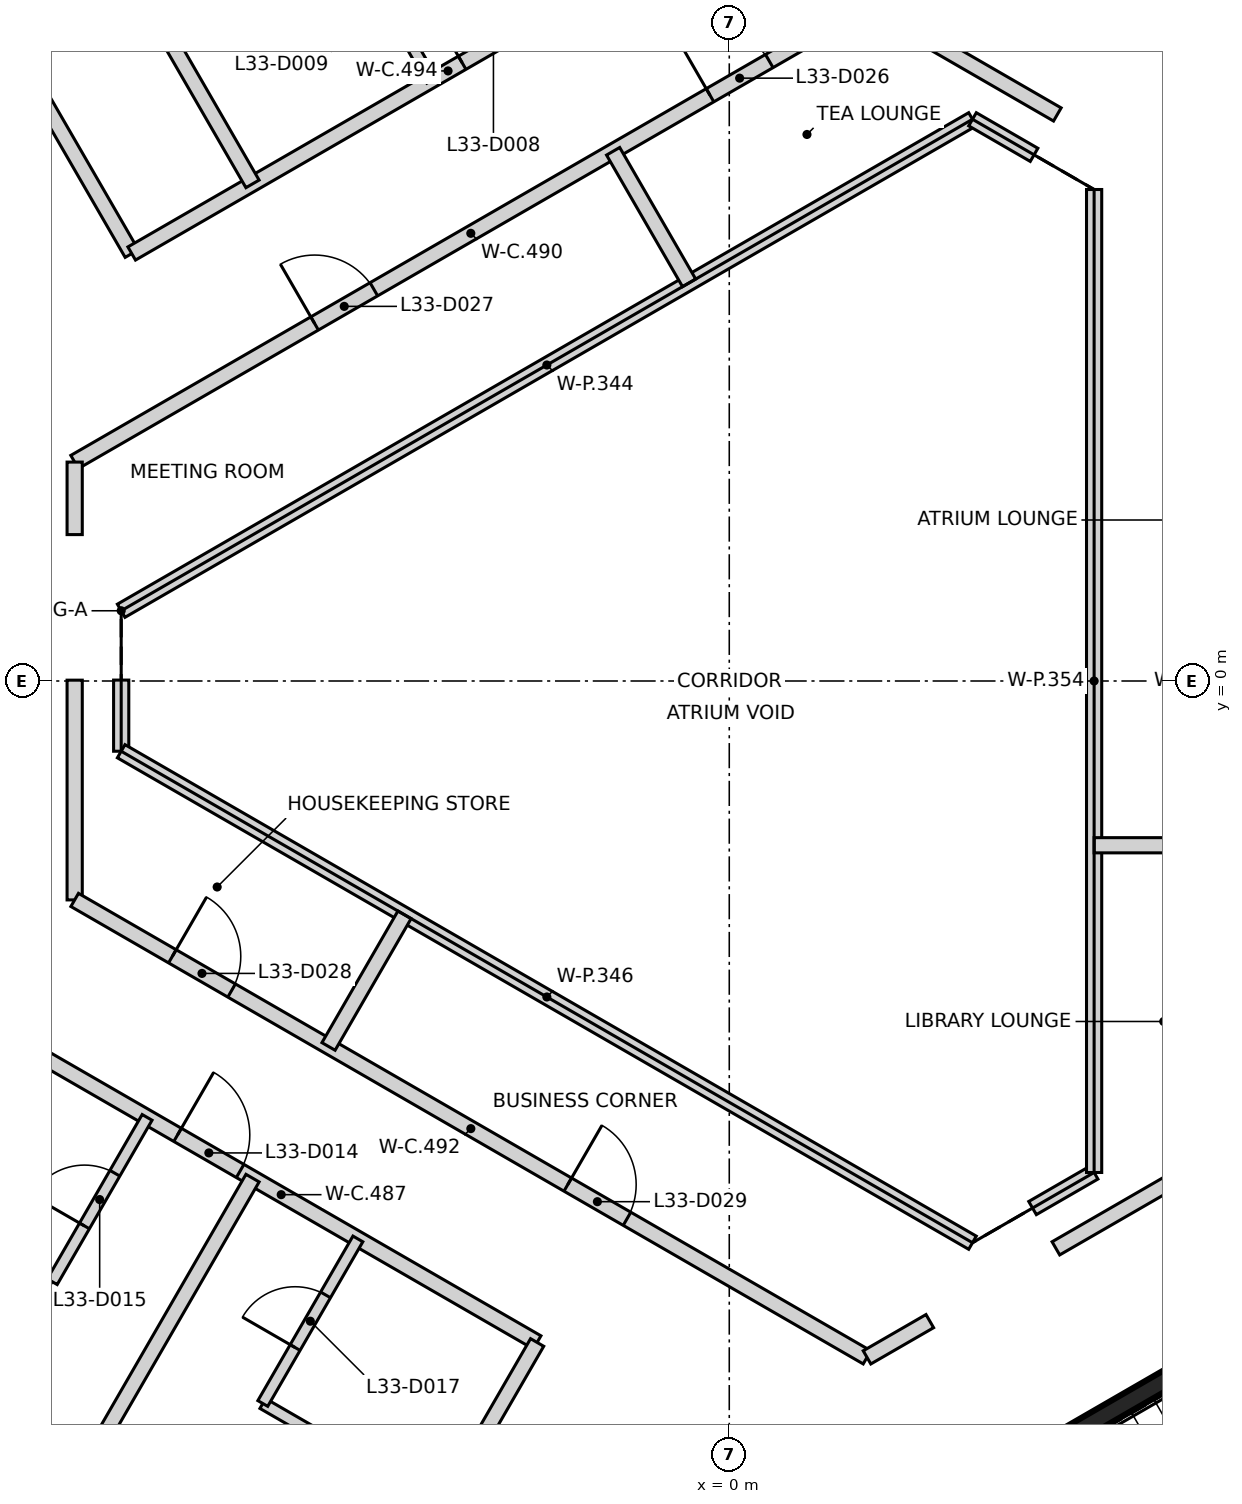
"""IFC4 building model, lengths in metres.
Left out: names, types, materials, properties, quantities, classifications, styles, units other than length and angle.
Written with IfcOpenShell. Run it as: python <this file> out.ifc"""

import sys

from ifc_helpers import new_model, si_unit, direction, frame, frame_2d, origin, place, context, subcontext, project, spatial, rectangle, extrude, element, fill, save


model = new_model("IFC4")
c1 = context("Model", 3, precision=1e-05, world=origin(), true_north=direction((0.0, 1.0)))
c2 = subcontext(c1, "Body", "Model", "MODEL_VIEW")
j1 = project(units=[si_unit("LENGTHUNIT", "METRE"), si_unit("PLANEANGLEUNIT", "RADIAN")], contexts=[c1])
p1 = place(None, origin())
s1 = spatial("IfcSite", under=j1, at=p1, CompositionType="ELEMENT")
p2 = place(p1, origin())
s2 = spatial("IfcBuilding", under=s1, at=p2, CompositionType="ELEMENT")
p3 = place(p2, frame((0.0, 0.0, 136.0)))
s3 = spatial("IfcBuildingStorey", under=s2, at=p3, CompositionType="ELEMENT", Elevation=136.0)
p4 = place(p3, frame((10.42, 6.498, 0.0), z_axis=(0.0, 0.0, 1.0), x_axis=(-0.866021906294, 0.500006057782, 0.0)))
e1 = element("IfcWall", 1, at=p4, inside=s3, PredefinedType="SHEAR", context=c2, shape_type="SweptSolid", body=[
    extrude(rectangle(XDim=11.55, YDim=0.25, at=frame_2d((5.775, 0.0))), origin(), (0.0, 0.0, 1.0), 3.2),
])
p5 = place(p4, frame((10.025, 0.0, 0.0)))
e2 = element("IfcOpeningElement", 2, at=p5, cuts=e1, PredefinedType="OPENING", context=c2, shape_type="SweptSolid", body=[
    extrude(rectangle(XDim=1.2, YDim=2.1, at=frame_2d((0.6, 1.05))), frame((0.0, 0.135, 0.0), z_axis=(0.0, -1.0, 0.0), x_axis=(1.0, 0.0, 0.0)), (0.0, 0.0, 1.0), 0.27),
])
p6 = place(p4, frame((8.725, 0.0, 0.0)))
e3 = element("IfcOpeningElement", 3, at=p6, cuts=e1, PredefinedType="OPENING", context=c2, shape_type="SweptSolid", body=[
    extrude(rectangle(XDim=1.2, YDim=2.1, at=frame_2d((0.6, 1.05))), frame((0.0, 0.135, 0.0), z_axis=(0.0, -1.0, 0.0), x_axis=(1.0, 0.0, 0.0)), (0.0, 0.0, 1.0), 0.27),
])
p7 = place(p3, frame((0.417, -12.273, 0.0), z_axis=(0.0, 0.0, 1.0), x_axis=(0.866021906294, 0.500006057782, 0.0)))
e4 = element("IfcWall", 4, at=p7, inside=s3, PredefinedType="SHEAR", context=c2, shape_type="SweptSolid", body=[
    extrude(rectangle(XDim=11.55, YDim=0.25, at=frame_2d((5.775, 0.0))), origin(), (0.0, 0.0, 1.0), 3.2),
])
p8 = place(p7, frame((10.025, 0.0, 0.0)))
e5 = element("IfcOpeningElement", 5, at=p8, cuts=e4, PredefinedType="OPENING", context=c2, shape_type="SweptSolid", body=[
    extrude(rectangle(XDim=1.2, YDim=2.1, at=frame_2d((0.6, 1.05))), frame((0.0, 0.135, 0.0), z_axis=(0.0, -1.0, 0.0), x_axis=(1.0, 0.0, 0.0)), (0.0, 0.0, 1.0), 0.27),
])
p9 = place(p7, frame((8.725, 0.0, 0.0)))
e6 = element("IfcOpeningElement", 6, at=p9, cuts=e4, PredefinedType="OPENING", context=c2, shape_type="SweptSolid", body=[
    extrude(rectangle(XDim=1.2, YDim=2.1, at=frame_2d((0.6, 1.05))), frame((0.0, 0.135, 0.0), z_axis=(0.0, -1.0, 0.0), x_axis=(1.0, 0.0, 0.0)), (0.0, 0.0, 1.0), 0.27),
])
p10 = place(p3, frame((-9.262, -4.814, 0.0), z_axis=(0.0, 0.0, 1.0), x_axis=(0.866109782156, -0.499853823887, 0.0)))
e7 = element("IfcWall", 7, at=p10, inside=s3, PredefinedType="PARTITIONING", context=c2, shape_type="SweptSolid", body=[
    extrude(rectangle(XDim=7.776, YDim=0.2, at=frame_2d((3.888, 0.0))), origin(), (0.0, 0.0, 1.0), 3.2),
])
p11 = place(p10, frame((2.314, 0.0, 0.0)))
e8 = element("IfcOpeningElement", 8, at=p11, cuts=e7, PredefinedType="OPENING", context=c2, shape_type="SweptSolid", body=[
    extrude(rectangle(XDim=0.95, YDim=2.1, at=frame_2d((0.475, 1.05))), frame((0.0, 0.11, 0.0), z_axis=(0.0, -1.0, 0.0), x_axis=(1.0, 0.0, 0.0)), (0.0, 0.0, 1.0), 0.22),
])
p12 = place(p3, frame((-9.033, 7.651, 0.0), z_axis=(0.0, 0.0, 1.0), x_axis=(0.500354010599, -0.865820919173, 0.0)))
e9 = element("IfcWall", 9, at=p12, inside=s3, PredefinedType="PARTITIONING", context=c2, shape_type="SweptSolid", body=[
    extrude(rectangle(XDim=2.342, YDim=0.2, at=frame_2d((1.171, 0.0))), origin(), (0.0, 0.0, 1.0), 3.2),
])
p13 = place(p3, frame((-8.613, 2.881, 0.0), z_axis=(0.0, 0.0, 1.0), x_axis=(0.866103179807, 0.499865263774, 0.0)))
e10 = element("IfcWall", 10, at=p13, inside=s3, PredefinedType="PARTITIONING", context=c2, shape_type="SweptSolid", body=[
    extrude(rectangle(XDim=12.036, YDim=0.2, at=frame_2d((6.018, 0.0))), origin(), (0.0, 0.0, 1.0), 3.2),
])
p14 = place(p13, frame((9.652, 0.0, 0.0)))
e11 = element("IfcOpeningElement", 11, at=p14, cuts=e10, PredefinedType="OPENING", context=c2, shape_type="SweptSolid", body=[
    extrude(rectangle(XDim=0.9, YDim=2.1, at=frame_2d((0.45, 1.05))), frame((0.0, 0.11, 0.0), z_axis=(0.0, -1.0, 0.0), x_axis=(1.0, 0.0, 0.0)), (0.0, 0.0, 1.0), 0.22),
])
p15 = place(p13, frame((3.646, 0.0, 0.0)))
e12 = element("IfcOpeningElement", 12, at=p15, cuts=e10, PredefinedType="OPENING", context=c2, shape_type="SweptSolid", body=[
    extrude(rectangle(XDim=0.9, YDim=2.1, at=frame_2d((0.45, 1.05))), frame((0.0, 0.11, 0.0), z_axis=(0.0, -1.0, 0.0), x_axis=(1.0, 0.0, 0.0)), (0.0, 0.0, 1.0), 0.22),
])
p16 = place(p3, frame((-8.612, -2.88, 0.0), z_axis=(0.0, 0.0, 1.0), x_axis=(0.0, 1.0, 0.0)))
e13 = element("IfcWall", 13, at=p16, inside=s3, PredefinedType="PARTITIONING", context=c2, shape_type="SweptSolid", body=[
    extrude(rectangle(XDim=2.891, YDim=0.2, at=frame_2d((1.445, 0.0))), origin(), (0.0, 0.0, 1.0), 2.3),
])
p17 = place(p3, frame((-8.612, -2.88, 0.0), z_axis=(0.0, 0.0, 1.0), x_axis=(0.866035279512, -0.499982894348, 0.0)))
e14 = element("IfcWall", 14, at=p17, inside=s3, PredefinedType="PARTITIONING", context=c2, shape_type="SweptSolid", body=[
    extrude(rectangle(XDim=12.037, YDim=0.2, at=frame_2d((6.018, 0.0))), origin(), (0.0, 0.0, 1.0), 3.2),
])
p18 = place(p17, frame((1.484, 0.0, 0.0)))
e15 = element("IfcOpeningElement", 15, at=p18, cuts=e14, PredefinedType="OPENING", context=c2, shape_type="SweptSolid", body=[
    extrude(rectangle(XDim=0.9, YDim=2.1, at=frame_2d((0.45, 1.05))), frame((0.0, 0.11, 0.0), z_axis=(0.0, -1.0, 0.0), x_axis=(1.0, 0.0, 0.0)), (0.0, 0.0, 1.0), 0.22),
])
p19 = place(p17, frame((7.491, 0.0, 0.0)))
e16 = element("IfcOpeningElement", 16, at=p19, cuts=e14, PredefinedType="OPENING", context=c2, shape_type="SweptSolid", body=[
    extrude(rectangle(XDim=0.9, YDim=2.1, at=frame_2d((0.45, 1.05))), frame((0.0, 0.11, 0.0), z_axis=(0.0, -1.0, 0.0), x_axis=(1.0, 0.0, 0.0)), (0.0, 0.0, 1.0), 0.22),
])
p20 = place(p3, frame((-8.612, 1.926, 0.0), z_axis=(0.0, 0.0, 1.0), x_axis=(0.0, 1.0, 0.0)))
e17 = element("IfcWall", 17, at=p20, inside=s3, PredefinedType="PARTITIONING", context=c2, shape_type="SweptSolid", body=[
    extrude(rectangle(XDim=0.954, YDim=0.2, at=frame_2d((0.477, 0.0))), origin(), (0.0, 0.0, 1.0), 3.2),
])
p21 = place(p3, frame((-7.862, 5.624, 0.0), z_axis=(0.0, 0.0, 1.0), x_axis=(0.866109024618, 0.499855136491, 0.0)))
e18 = element("IfcWall", 18, at=p21, inside=s3, PredefinedType="PARTITIONING", context=c2, shape_type="SweptSolid", body=[
    extrude(rectangle(XDim=9.61, YDim=0.2, at=frame_2d((4.805, 0.0))), origin(), (0.0, 0.0, 1.0), 3.2),
])
p22 = place(p21, frame((6.345, 0.0, 0.0)))
e19 = element("IfcOpeningElement", 19, at=p22, cuts=e18, PredefinedType="OPENING", context=c2, shape_type="SweptSolid", body=[
    extrude(rectangle(XDim=0.95, YDim=2.1, at=frame_2d((0.475, 1.05))), frame((0.0, 0.11, 0.0), z_axis=(0.0, -1.0, 0.0), x_axis=(1.0, 0.0, 0.0)), (0.0, 0.0, 1.0), 0.22),
])
p23 = place(p21, frame((5.02, 0.0, 0.0)))
e20 = element("IfcOpeningElement", 20, at=p23, cuts=e18, PredefinedType="OPENING", context=c2, shape_type="SweptSolid", body=[
    extrude(rectangle(XDim=0.95, YDim=2.1, at=frame_2d((0.475, 1.05))), frame((0.0, 0.11, 0.0), z_axis=(0.0, -1.0, 0.0), x_axis=(1.0, 0.0, 0.0)), (0.0, 0.0, 1.0), 0.22),
])
p24 = place(p3, frame((-4.629, -12.341, 0.0), z_axis=(0.0, 0.0, 1.0), x_axis=(0.500069467685, 0.865985292883, 0.0)))
e21 = element("IfcWall", 21, at=p24, inside=s3, PredefinedType="PARTITIONING", context=c2, shape_type="SweptSolid", body=[
    extrude(rectangle(XDim=4.202, YDim=0.2, at=frame_2d((2.101, 0.0))), origin(), (0.0, 0.0, 1.0), 3.2),
])
p25 = place(p24, frame((0.564, 0.0, 0.0)))
e22 = element("IfcOpeningElement", 22, at=p25, cuts=e21, PredefinedType="OPENING", context=c2, shape_type="SweptSolid", body=[
    extrude(rectangle(XDim=0.95, YDim=2.1, at=frame_2d((0.475, 1.05))), frame((0.0, 0.11, 0.0), z_axis=(0.0, -1.0, 0.0), x_axis=(1.0, 0.0, 0.0)), (0.0, 0.0, 1.0), 0.22),
])
p26 = place(p3, frame((1.812, -8.898, 0.0), z_axis=(0.0, 0.0, 1.0), x_axis=(0.866108878364, 0.499855389907, 0.0)))
e23 = element("IfcWall", 23, at=p26, inside=s3, PredefinedType="PARTITIONING", context=c2, shape_type="SweptSolid", body=[
    extrude(rectangle(XDim=0.954, YDim=0.2, at=frame_2d((0.477, 0.0))), origin(), (0.0, 0.0, 1.0), 3.2),
])
p27 = place(p3, frame((1.813, 8.899, 0.0), z_axis=(0.0, 0.0, 1.0), x_axis=(0.865957732194, -0.50011719232, 0.0)))
e24 = element("IfcWall", 24, at=p27, inside=s3, PredefinedType="PARTITIONING", context=c2, shape_type="SweptSolid", body=[
    extrude(rectangle(XDim=2.891, YDim=0.2, at=frame_2d((1.445, 0.0))), origin(), (0.0, 0.0, 1.0), 2.3),
])
p28 = place(p3, frame((4.297, -7.464, 0.0), z_axis=(0.0, 0.0, 1.0), x_axis=(0.86602521942, 0.500000319328, 0.0)))
e25 = element("IfcWall", 25, at=p28, inside=s3, PredefinedType="PARTITIONING", context=c2, shape_type="SweptSolid", body=[
    extrude(rectangle(XDim=2.89, YDim=0.2, at=frame_2d((1.445, 0.0))), origin(), (0.0, 0.0, 1.0), 2.3),
])
p29 = place(p3, frame((-12.279, 16.946, 0.0), z_axis=(0.0, 0.0, 1.0), x_axis=(0.499902454835, -0.866081714187, 0.0)))
e26 = element("IfcWall", 26, at=p29, inside=s3, PredefinedType="PARTITIONING", context=c2, shape_type="SweptSolid", body=[
    extrude(rectangle(XDim=12.015, YDim=0.2, at=frame_2d((6.008, 0.0))), origin(), (0.0, 0.0, 1.0), 3.2),
])
p30 = place(p3, frame((-12.278, -16.946, 0.0), z_axis=(0.0, 0.0, 1.0), x_axis=(0.499887212932, 0.866090511637, 0.0)))
e27 = element("IfcWall", 27, at=p30, inside=s3, PredefinedType="PARTITIONING", context=c2, shape_type="SweptSolid", body=[
    extrude(rectangle(XDim=12.015, YDim=0.2, at=frame_2d((6.007, 0.0))), origin(), (0.0, 0.0, 1.0), 3.2),
])
p31 = place(p3, frame((-8.0, 0.924, 0.0), z_axis=(0.0, 0.0, 1.0), x_axis=(0.86604129137, 0.499972480886, 0.0)))
e28 = element("IfcWall", 28, at=p31, inside=s3, PredefinedType="PARTITIONING", context=c2, shape_type="SweptSolid", body=[
    extrude(rectangle(XDim=12.932, YDim=0.2, at=frame_2d((6.466, 0.0))), origin(), (0.0, 0.0, 1.0), 2.3),
])
p32 = place(p3, frame((-8.0, -0.924, 0.0), z_axis=(0.0, 0.0, 1.0), x_axis=(0.0, 1.0, 0.0)))
e29 = element("IfcWall", 29, at=p32, inside=s3, PredefinedType="PARTITIONING", context=c2, shape_type="SweptSolid", body=[
    extrude(rectangle(XDim=0.936, YDim=0.2, at=frame_2d((0.468, 0.0))), origin(), (0.0, 0.0, 1.0), 2.3),
])
p33 = place(p3, frame((-8.0, -0.924, 0.0), z_axis=(0.0, 0.0, 1.0), x_axis=(0.86604129137, -0.499972480886, 0.0)))
e30 = element("IfcWall", 30, at=p33, inside=s3, PredefinedType="PARTITIONING", context=c2, shape_type="SweptSolid", body=[
    extrude(rectangle(XDim=12.932, YDim=0.2, at=frame_2d((6.466, 0.0))), origin(), (0.0, 0.0, 1.0), 2.3),
])
p34 = place(p3, frame((-5.272, -4.808, 0.0), z_axis=(0.0, 0.0, 1.0), x_axis=(0.499880961361, 0.866094119867, 0.0)))
e31 = element("IfcWall", 31, at=p34, inside=s3, PredefinedType="PARTITIONING", context=c2, shape_type="SweptSolid", body=[
    extrude(rectangle(XDim=2.0, YDim=0.2, at=frame_2d((1.0, 0.0))), origin(), (0.0, 0.0, 1.0), 2.3),
])
p35 = place(p3, frame((-1.528, 6.969, 0.0), z_axis=(0.0, 0.0, 1.0), x_axis=(0.500000846469, -0.866024915075, 0.0)))
e32 = element("IfcWall", 32, at=p35, inside=s3, PredefinedType="PARTITIONING", context=c2, shape_type="SweptSolid", body=[
    extrude(rectangle(XDim=1.999, YDim=0.2, at=frame_2d((1.0, 0.0))), origin(), (0.0, 0.0, 1.0), 3.2),
])
p36 = place(p3, frame((3.2, 7.39, 0.0), z_axis=(0.0, 0.0, 1.0), x_axis=(0.865985641702, -0.500068863623, 0.0)))
e33 = element("IfcWall", 33, at=p36, inside=s3, PredefinedType="PARTITIONING", context=c2, shape_type="SweptSolid", body=[
    extrude(rectangle(XDim=0.935, YDim=0.2, at=frame_2d((0.468, 0.0))), origin(), (0.0, 0.0, 1.0), 2.3),
])
p37 = place(p3, frame((3.99, -6.934, 0.0), z_axis=(0.0, 0.0, 1.0), x_axis=(0.865872609263, 0.500264554538, 0.0)))
e34 = element("IfcWall", 34, at=p37, inside=s3, PredefinedType="PARTITIONING", context=c2, shape_type="SweptSolid", body=[
    extrude(rectangle(XDim=0.936, YDim=0.2, at=frame_2d((0.468, 0.0))), origin(), (0.0, 0.0, 1.0), 2.3),
])
p38 = place(p3, frame((4.8, -6.466, 0.0), z_axis=(0.0, 0.0, 1.0), x_axis=(0.0, 1.0, 0.0)))
e35 = element("IfcWall", 35, at=p38, inside=s3, PredefinedType="PARTITIONING", context=c2, shape_type="SweptSolid", body=[
    extrude(rectangle(XDim=12.932, YDim=0.2, at=frame_2d((6.466, 0.0))), origin(), (0.0, 0.0, 1.0), 2.3),
])
p39 = place(p3, frame((4.8, -2.161, 0.0), z_axis=(0.0, 0.0, 1.0), x_axis=(1.0, 0.0, 0.0)))
e36 = element("IfcWall", 36, at=p39, inside=s3, PredefinedType="PARTITIONING", context=c2, shape_type="SweptSolid", body=[
    extrude(rectangle(XDim=2.0, YDim=0.2, at=frame_2d((1.0, 0.0))), origin(), (0.0, 0.0, 1.0), 2.3),
])
p40 = place(p3, frame((-10.51, -6.98, 0.0), z_axis=(0.0, 0.0, 1.0), x_axis=(0.865965533559, -0.500103683937, 0.0)))
e37 = element("IfcWall", 37, at=p40, inside=s3, PredefinedType="PARTITIONING", context=c2, shape_type="SweptSolid", body=[
    extrude(rectangle(XDim=1.848, YDim=0.15, at=frame_2d((0.924, 0.0))), origin(), (0.0, 0.0, 1.0), 3.2),
])
p41 = place(p3, frame((-8.907, -7.903, 0.0), z_axis=(0.0, 0.0, 1.0), x_axis=(0.499925626596, 0.866068339032, 0.0)))
e38 = element("IfcWall", 38, at=p41, inside=s3, PredefinedType="PARTITIONING", context=c2, shape_type="SweptSolid", body=[
    extrude(rectangle(XDim=2.497, YDim=0.15, at=frame_2d((1.248, 0.0))), origin(), (0.0, 0.0, 1.0), 3.2),
])
p42 = place(p41, frame((0.848, 0.0, 0.0)))
e39 = element("IfcOpeningElement", 39, at=p42, cuts=e38, PredefinedType="OPENING", context=c2, shape_type="SweptSolid", body=[
    extrude(rectangle(XDim=0.8, YDim=2.1, at=frame_2d((0.4, 1.05))), frame((0.0, 0.085, 0.0), z_axis=(0.0, -1.0, 0.0), x_axis=(1.0, 0.0, 0.0)), (0.0, 0.0, 1.0), 0.17),
])
p43 = place(p3, frame((-6.137, -9.505, 0.0), z_axis=(0.0, 0.0, 1.0), x_axis=(0.866000497904, -0.50004313577, 0.0)))
e40 = element("IfcWall", 40, at=p43, inside=s3, PredefinedType="PARTITIONING", context=c2, shape_type="SweptSolid", body=[
    extrude(rectangle(XDim=2.724, YDim=0.15, at=frame_2d((1.362, 0.0))), origin(), (0.0, 0.0, 1.0), 3.2),
])
p44 = place(p3, frame((-6.137, -9.505, 0.0), z_axis=(0.0, 0.0, 1.0), x_axis=(0.500339416332, 0.86582935297, 0.0)))
e41 = element("IfcWall", 41, at=p44, inside=s3, PredefinedType="PARTITIONING", context=c2, shape_type="SweptSolid", body=[
    extrude(rectangle(XDim=2.5, YDim=0.15, at=frame_2d((1.25, 0.0))), origin(), (0.0, 0.0, 1.0), 3.2),
])
p45 = place(p44, frame((0.85, 0.0, 0.0)))
e42 = element("IfcOpeningElement", 42, at=p45, cuts=e41, PredefinedType="OPENING", context=c2, shape_type="SweptSolid", body=[
    extrude(rectangle(XDim=0.8, YDim=2.1, at=frame_2d((0.4, 1.05))), frame((0.0, 0.085, 0.0), z_axis=(0.0, -1.0, 0.0), x_axis=(1.0, 0.0, 0.0)), (0.0, 0.0, 1.0), 0.17),
])
p46 = place(p3, frame((-5.164, 10.067, 0.0), z_axis=(0.0, 0.0, 1.0), x_axis=(0.500046524342, -0.865998541277, 0.0)))
e43 = element("IfcWall", 43, at=p46, inside=s3, PredefinedType="PARTITIONING", context=c2, shape_type="SweptSolid", body=[
    extrude(rectangle(XDim=2.5, YDim=0.15, at=frame_2d((1.25, 0.0))), origin(), (0.0, 0.0, 1.0), 3.2),
])
p47 = place(p46, frame((0.85, 0.0, 0.0)))
e44 = element("IfcOpeningElement", 44, at=p47, cuts=e43, PredefinedType="OPENING", context=c2, shape_type="SweptSolid", body=[
    extrude(rectangle(XDim=0.8, YDim=2.1, at=frame_2d((0.4, 1.05))), frame((0.0, 0.085, 0.0), z_axis=(0.0, -1.0, 0.0), x_axis=(1.0, 0.0, 0.0)), (0.0, 0.0, 1.0), 0.17),
])
p48 = place(p23, origin())
e45 = element("IfcDoor", 45, at=p48, inside=s3, OperationType="SINGLE_SWING_LEFT", PredefinedType="DOOR", context=c2, shape_type="SweptSolid", body=[
    extrude(rectangle(XDim=0.95, YDim=2.1, at=frame_2d((0.475, 1.05))), frame((0.0, 0.025, 0.0), z_axis=(0.0, -1.0, 0.0), x_axis=(1.0, 0.0, 0.0)), (0.0, 0.0, 1.0), 0.05),
])
fill(e20, e45)
p49 = place(p11, frame((0.95, 0.0, 0.0), z_axis=(0.0, 0.0, 1.0), x_axis=(-1.0, 0.0, 0.0)))
e46 = element("IfcDoor", 46, at=p49, inside=s3, OperationType="SINGLE_SWING_LEFT", PredefinedType="DOOR", context=c2, shape_type="SweptSolid", body=[
    extrude(rectangle(XDim=0.95, YDim=2.1, at=frame_2d((0.475, 1.05))), frame((0.0, 0.025, 0.0), z_axis=(0.0, -1.0, 0.0), x_axis=(1.0, 0.0, 0.0)), (0.0, 0.0, 1.0), 0.05),
])
fill(e8, e46)
p50 = place(p42, origin())
e47 = element("IfcDoor", 47, at=p50, inside=s3, OperationType="SINGLE_SWING_LEFT", PredefinedType="DOOR", context=c2, shape_type="SweptSolid", body=[
    extrude(rectangle(XDim=0.8, YDim=2.1, at=frame_2d((0.4, 1.05))), frame((0.0, 0.025, 0.0), z_axis=(0.0, -1.0, 0.0), x_axis=(1.0, 0.0, 0.0)), (0.0, 0.0, 1.0), 0.05),
])
fill(e39, e47)
p51 = place(p45, frame((0.8, 0.0, 0.0), z_axis=(0.0, 0.0, 1.0), x_axis=(-1.0, 0.0, 0.0)))
e48 = element("IfcDoor", 48, at=p51, inside=s3, OperationType="SINGLE_SWING_LEFT", PredefinedType="DOOR", context=c2, shape_type="SweptSolid", body=[
    extrude(rectangle(XDim=0.8, YDim=2.1, at=frame_2d((0.4, 1.05))), frame((0.0, 0.025, 0.0), z_axis=(0.0, -1.0, 0.0), x_axis=(1.0, 0.0, 0.0)), (0.0, 0.0, 1.0), 0.05),
])
fill(e42, e48)
p52 = place(p14, frame((0.9, 0.0, 0.0), z_axis=(0.0, 0.0, 1.0), x_axis=(-1.0, 0.0, 0.0)))
e49 = element("IfcDoor", 49, at=p52, inside=s3, OperationType="SINGLE_SWING_LEFT", PredefinedType="DOOR", context=c2, shape_type="SweptSolid", body=[
    extrude(rectangle(XDim=0.9, YDim=2.1, at=frame_2d((0.45, 1.05))), frame((0.0, 0.025, 0.0), z_axis=(0.0, -1.0, 0.0), x_axis=(1.0, 0.0, 0.0)), (0.0, 0.0, 1.0), 0.05),
])
fill(e11, e49)
p53 = place(p15, frame((0.9, 0.0, 0.0), z_axis=(0.0, 0.0, 1.0), x_axis=(-1.0, 0.0, 0.0)))
e50 = element("IfcDoor", 50, at=p53, inside=s3, OperationType="SINGLE_SWING_LEFT", PredefinedType="DOOR", context=c2, shape_type="SweptSolid", body=[
    extrude(rectangle(XDim=0.9, YDim=2.1, at=frame_2d((0.45, 1.05))), frame((0.0, 0.025, 0.0), z_axis=(0.0, -1.0, 0.0), x_axis=(1.0, 0.0, 0.0)), (0.0, 0.0, 1.0), 0.05),
])
fill(e12, e50)
p54 = place(p18, origin())
e51 = element("IfcDoor", 51, at=p54, inside=s3, OperationType="SINGLE_SWING_LEFT", PredefinedType="DOOR", context=c2, shape_type="SweptSolid", body=[
    extrude(rectangle(XDim=0.9, YDim=2.1, at=frame_2d((0.45, 1.05))), frame((0.0, 0.025, 0.0), z_axis=(0.0, -1.0, 0.0), x_axis=(1.0, 0.0, 0.0)), (0.0, 0.0, 1.0), 0.05),
])
fill(e15, e51)
p55 = place(p19, origin())
e52 = element("IfcDoor", 52, at=p55, inside=s3, OperationType="SINGLE_SWING_LEFT", PredefinedType="DOOR", context=c2, shape_type="SweptSolid", body=[
    extrude(rectangle(XDim=0.9, YDim=2.1, at=frame_2d((0.45, 1.05))), frame((0.0, 0.025, 0.0), z_axis=(0.0, -1.0, 0.0), x_axis=(1.0, 0.0, 0.0)), (0.0, 0.0, 1.0), 0.05),
])
fill(e16, e52)
save(model, sys.argv[1])
